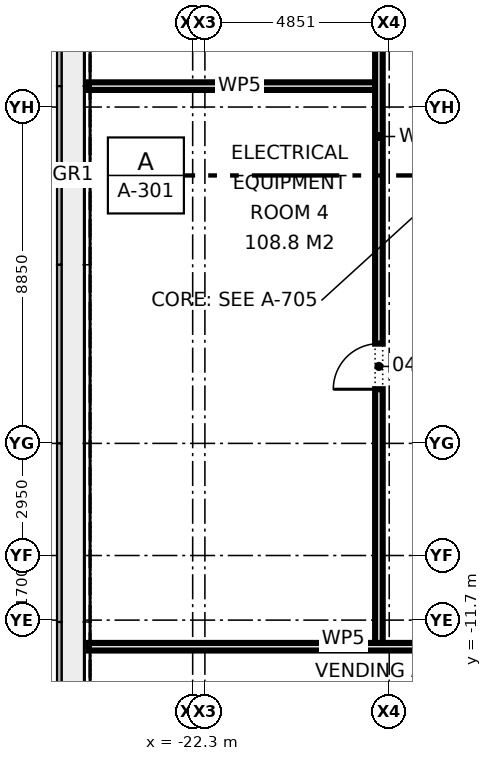
"""IFC4 building model, lengths in metres.
Left out: names, types, materials, properties, quantities, classifications, styles, units other than length and angle.
Written with IfcOpenShell. Run it as: python <this file> out.ifc"""

import sys

from ifc_helpers import new_model, si_unit, direction, frame, frame_2d, origin, place, context, subcontext, project, spatial, rectangle, extrude, element, fill, save


model = new_model("IFC4")
c1 = context("Model", 3, precision=1e-05, world=origin(), true_north=direction((0.0, 1.0)))
c2 = subcontext(c1, "Body", "Model", "MODEL_VIEW")
j1 = project(units=[si_unit("LENGTHUNIT", "METRE"), si_unit("PLANEANGLEUNIT", "RADIAN")], contexts=[c1])
p1 = place(None, origin())
s1 = spatial("IfcSite", under=j1, at=p1, CompositionType="ELEMENT")
p2 = place(p1, origin())
s2 = spatial("IfcBuilding", under=s1, at=p2, CompositionType="ELEMENT")
p3 = place(p2, frame((0.0, 0.0, 16.1)))
s3 = spatial("IfcBuildingStorey", under=s2, at=p3, CompositionType="ELEMENT", Elevation=16.1)
p4 = place(p3, frame((-25.03, -12.4, 0.0), z_axis=(0.0, 0.0, 1.0), x_axis=(1.0, 0.0, 0.0)))
e1 = element("IfcWall", 1, at=p4, inside=s3, PredefinedType="PARTITIONING", context=c2, shape_type="SweptSolid", body=[
    extrude(rectangle(XDim=13.38, YDim=0.2, at=frame_2d((6.69, 0.0))), origin(), (0.0, 0.0, 1.0), 4.575),
])
p5 = place(p3, frame((-25.03, 2.35, 0.0), z_axis=(0.0, 0.0, 1.0), x_axis=(1.0, 0.0, 0.0)))
e2 = element("IfcWall", 2, at=p5, inside=s3, PredefinedType="PARTITIONING", context=c2, shape_type="SweptSolid", body=[
    extrude(rectangle(XDim=7.53, YDim=0.2, at=frame_2d((3.765, 0.0))), origin(), (0.0, 0.0, 1.0), 4.575),
])
p6 = place(p3, frame((-17.4, -12.3, 0.0), z_axis=(0.0, 0.0, 1.0), x_axis=(0.0, 1.0, 0.0)))
e3 = element("IfcWall", 3, at=p6, inside=s3, PredefinedType="PARTITIONING", context=c2, shape_type="SweptSolid", body=[
    extrude(rectangle(XDim=24.6, YDim=0.2, at=frame_2d((12.3, 0.0))), origin(), (0.0, 0.0, 1.0), 4.575),
])
p7 = place(p6, frame((6.675, 0.0, 0.0)))
e4 = element("IfcOpeningElement", 4, at=p7, cuts=e3, PredefinedType="OPENING", context=c2, shape_type="SweptSolid", body=[
    extrude(rectangle(XDim=1.2, YDim=2.1, at=frame_2d((0.6, 1.05))), frame((0.0, 0.11, 0.0), z_axis=(0.0, -1.0, 0.0), x_axis=(1.0, 0.0, 0.0)), (0.0, 0.0, 1.0), 0.22),
])
p8 = place(p6, frame((18.775, 0.0, 0.0)))
e5 = element("IfcOpeningElement", 5, at=p8, cuts=e3, PredefinedType="OPENING", context=c2, shape_type="SweptSolid", body=[
    extrude(rectangle(XDim=1.8, YDim=2.1, at=frame_2d((0.9, 1.05))), frame((0.0, 0.11, 0.0), z_axis=(0.0, -1.0, 0.0), x_axis=(1.0, 0.0, 0.0)), (0.0, 0.0, 1.0), 0.22),
])
p9 = place(p7, origin())
e6 = element("IfcDoor", 6, at=p9, inside=s3, OperationType="SINGLE_SWING_LEFT", PredefinedType="DOOR", context=c2, shape_type="SweptSolid", body=[
    extrude(rectangle(XDim=1.2, YDim=2.1, at=frame_2d((0.6, 1.05))), frame((0.0, 0.025, 0.0), z_axis=(0.0, -1.0, 0.0), x_axis=(1.0, 0.0, 0.0)), (0.0, 0.0, 1.0), 0.05),
])
fill(e4, e6)
save(model, sys.argv[1])
